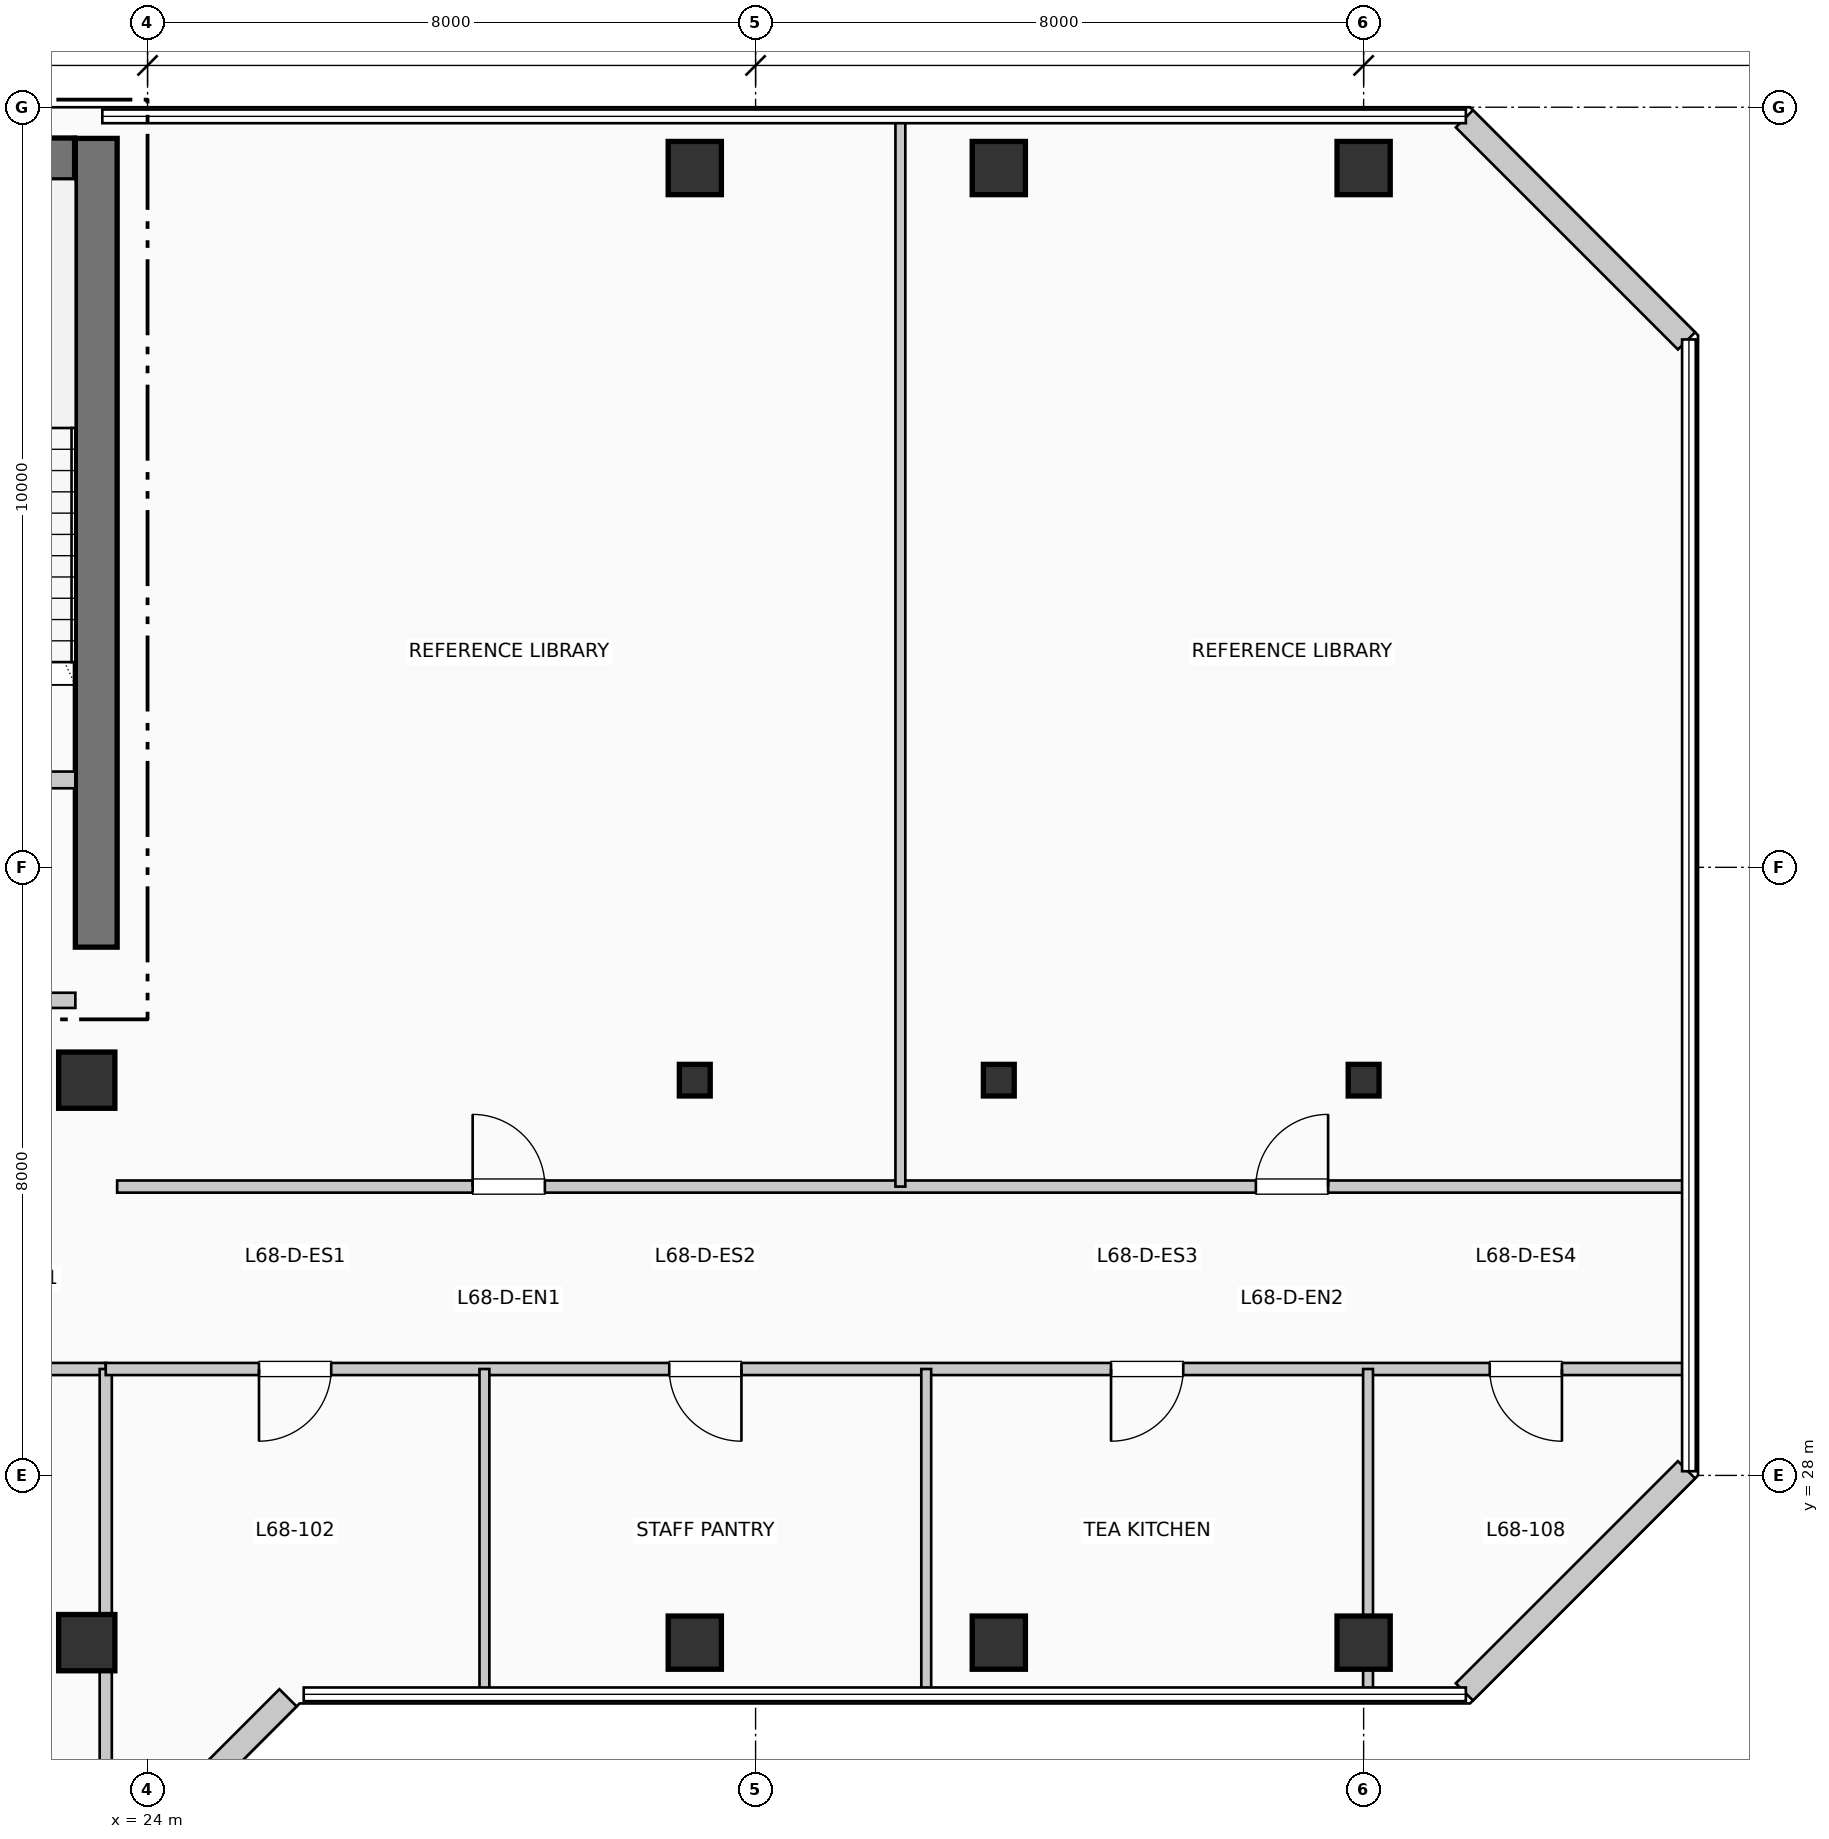
"""IFC4 building model, lengths in metres.
Left out: names, types, materials, properties, quantities, classifications, styles, units other than length and angle.
Written with IfcOpenShell. Run it as: python <this file> out.ifc"""

import sys

from ifc_helpers import new_model, si_unit, direction, frame, frame_2d, origin, origin_2d, place, context, subcontext, project, spatial, rectangle, i_section, extrude, element, fill, save


model = new_model("IFC4")
c1 = context("Model", 3, precision=1e-05, world=origin(), true_north=direction((0.0, 1.0)))
c2 = subcontext(c1, "Body", "Model", "MODEL_VIEW")
j1 = project(units=[si_unit("LENGTHUNIT", "METRE"), si_unit("PLANEANGLEUNIT", "RADIAN")], contexts=[c1])
p1 = place(None, origin())
s1 = spatial("IfcSite", under=j1, at=p1, CompositionType="ELEMENT")
p2 = place(p1, origin())
s2 = spatial("IfcBuilding", under=s1, at=p2, CompositionType="ELEMENT")
p3 = place(p2, frame((0.0, 0.0, 280.17)))
s3 = spatial("IfcBuildingStorey", under=s2, at=p3, CompositionType="ELEMENT", Elevation=280.17)
p4 = place(p3, frame((23.325, 34.95, 0.0), z_axis=(0.0, 0.0, 1.0), x_axis=(0.0, 1.0, 0.0)))
e1 = element("IfcWall", 1, at=p4, inside=s3, PredefinedType="SHEAR", context=c2, shape_type="SweptSolid", body=[
    extrude(rectangle(XDim=10.64, YDim=0.55, at=frame_2d((5.32, 0.0))), origin(), (0.0, 0.0, 1.0), 3.96),
])
p5 = place(p3, frame((19.35, 45.32, 0.0), z_axis=(0.0, 0.0, 1.0), x_axis=(1.0, 0.0, 0.0)))
e2 = element("IfcWall", 2, at=p5, inside=s3, PredefinedType="SHEAR", context=c2, shape_type="SweptSolid", body=[
    extrude(rectangle(XDim=3.69, YDim=0.55, at=frame_2d((1.845, 0.0))), origin(), (0.0, 0.0, 1.0), 3.96),
])
p6 = place(p5, frame((1.15, 0.0, 1.05)))
e3 = element("IfcOpeningElement", 3, at=p6, cuts=e2, PredefinedType="OPENING", context=c2, shape_type="SweptSolid", body=[
    extrude(rectangle(XDim=1.4, YDim=1.8, at=frame_2d((0.7, 0.9))), frame((0.0, 0.285, 0.0), z_axis=(0.0, -1.0, 0.0), x_axis=(1.0, 0.0, 0.0)), (0.0, 0.0, 1.0), 0.57),
])
for number, where, z_axis, x_axis in (
    (4, (23.2, 25.8, 0.0), (0.0, 0.0, 1.0), (1.0, 0.0, 0.0)),
    (5, (23.2, 33.2, 0.0), (0.0, 0.0, 1.0), (1.0, 0.0, 0.0)),
):
    element("IfcColumn", number, at=place(p3, frame(where, z_axis=z_axis, x_axis=x_axis)), inside=s3, PredefinedType="COLUMN", context=c2, shape_type="SweptSolid", body=[
        extrude(rectangle(XDim=0.74, YDim=0.74, at=origin_2d()), origin(), (0.0, 0.0, 1.0), 3.96),
    ])
p7 = place(p3, frame((31.2, 25.8, 0.0), z_axis=(0.0, 0.0, 1.0), x_axis=(1.0, 0.0, 0.0)))
e6 = element("IfcColumn", 6, at=p7, inside=s3, PredefinedType="COLUMN", context=c2, shape_type="SweptSolid", body=[
    extrude(rectangle(XDim=0.7, YDim=0.7, at=origin_2d()), origin(), (0.0, 0.0, 1.0), 3.96),
])
p8 = place(p3, frame((31.2, 33.2, 0.0), z_axis=(0.0, 0.0, 1.0), x_axis=(1.0, 0.0, 0.0)))
e7 = element("IfcColumn", 7, at=p8, inside=s3, PredefinedType="COLUMN", context=c2, shape_type="SweptSolid", body=[
    extrude(i_section(OverallWidth=0.406, OverallDepth=0.416, WebThickness=0.022, FlangeThickness=0.036, at=origin_2d()), origin(), (0.0, 0.0, 1.0), 3.96),
])
for number, where, z_axis, x_axis in (
    (8, (31.2, 45.2, 0.0), (0.0, 0.0, 1.0), (1.0, 0.0, 0.0)),
    (9, (35.2, 25.8, 0.0), (0.0, 0.0, 1.0), (1.0, 0.0, 0.0)),
):
    element("IfcColumn", number, at=place(p3, frame(where, z_axis=z_axis, x_axis=x_axis)), inside=s3, PredefinedType="COLUMN", context=c2, shape_type="SweptSolid", body=[
        extrude(rectangle(XDim=0.7, YDim=0.7, at=origin_2d()), origin(), (0.0, 0.0, 1.0), 3.96),
    ])
p9 = place(p3, frame((35.2, 33.2, 0.0), z_axis=(0.0, 0.0, 1.0), x_axis=(1.0, 0.0, 0.0)))
e10 = element("IfcColumn", 10, at=p9, inside=s3, PredefinedType="COLUMN", context=c2, shape_type="SweptSolid", body=[
    extrude(i_section(OverallWidth=0.406, OverallDepth=0.416, WebThickness=0.022, FlangeThickness=0.036, at=origin_2d()), origin(), (0.0, 0.0, 1.0), 3.96),
])
for number, where, z_axis, x_axis in (
    (11, (35.2, 45.2, 0.0), (0.0, 0.0, 1.0), (1.0, 0.0, 0.0)),
    (12, (40.0, 25.8, 0.0), (0.0, 0.0, 1.0), (1.0, 0.0, 0.0)),
):
    element("IfcColumn", number, at=place(p3, frame(where, z_axis=z_axis, x_axis=x_axis)), inside=s3, PredefinedType="COLUMN", context=c2, shape_type="SweptSolid", body=[
        extrude(rectangle(XDim=0.7, YDim=0.7, at=origin_2d()), origin(), (0.0, 0.0, 1.0), 3.96),
    ])
p10 = place(p3, frame((40.0, 33.2, 0.0), z_axis=(0.0, 0.0, 1.0), x_axis=(1.0, 0.0, 0.0)))
e13 = element("IfcColumn", 13, at=p10, inside=s3, PredefinedType="COLUMN", context=c2, shape_type="SweptSolid", body=[
    extrude(i_section(OverallWidth=0.406, OverallDepth=0.416, WebThickness=0.022, FlangeThickness=0.036, at=origin_2d()), origin(), (0.0, 0.0, 1.0), 3.96),
])
p11 = place(p3, frame((40.0, 45.2, 0.0), z_axis=(0.0, 0.0, 1.0), x_axis=(1.0, 0.0, 0.0)))
e14 = element("IfcColumn", 14, at=p11, inside=s3, PredefinedType="COLUMN", context=c2, shape_type="SweptSolid", body=[
    extrude(rectangle(XDim=0.7, YDim=0.7, at=origin_2d()), origin(), (0.0, 0.0, 1.0), 3.96),
])
p12 = place(p3, frame((23.926, 23.152, 0.0), z_axis=(0.0, 0.0, 1.0), x_axis=(0.707106781187, 0.707106781187, 0.0)))
e15 = element("IfcWall", 15, at=p12, inside=s3, PredefinedType="SOLIDWALL", context=c2, shape_type="SweptSolid", body=[
    extrude(rectangle(XDim=2.718, YDim=0.32, at=frame_2d((1.359, 0.0))), origin(), (0.0, 0.0, 1.0), 3.74),
])
for number, where, z_axis, x_axis in (
    (16, (41.326, 25.152, 0.0), (0.0, 0.0, 1.0), (0.707, 0.707, 0.0)),
    (17, (44.248, 42.926, 0.0), (0.0, 0.0, 1.0), (-0.707, 0.707, 0.0)),
):
    element("IfcWall", number, at=place(p3, frame(where, z_axis=z_axis, x_axis=x_axis)), inside=s3, PredefinedType="SOLIDWALL", context=c2, shape_type="SweptSolid", body=[
        extrude(rectangle(XDim=4.133, YDim=0.32, at=frame_2d((2.066, 0.0))), origin(), (0.0, 0.0, 1.0), 3.74),
    ])
p13 = place(p3, frame((19.9, 37.15, 0.0), z_axis=(0.0, 0.0, 1.0), x_axis=(1.0, 0.0, 0.0)))
e18 = element("IfcWall", 18, at=p13, inside=s3, PredefinedType="PARTITIONING", context=c2, shape_type="SweptSolid", body=[
    extrude(rectangle(XDim=3.15, YDim=0.22, at=frame_2d((1.575, 0.0))), origin(), (0.0, 0.0, 1.0), 3.74),
])
p14 = place(p13, frame((2.05, 0.0, 0.0), z_axis=(0.0, 0.0, 1.0), x_axis=(-1.0, 0.0, 0.0)))
e19 = element("IfcOpeningElement", 19, at=p14, cuts=e18, PredefinedType="OPENING", context=c2, shape_type="SweptSolid", body=[
    extrude(rectangle(XDim=1.05, YDim=2.15, at=frame_2d((0.525, 1.075))), frame((0.0, 0.12, 0.0), z_axis=(0.0, -1.0, 0.0), x_axis=(1.0, 0.0, 0.0)), (0.0, 0.0, 1.0), 0.24),
])
p15 = place(p3, frame((19.8, 34.25, 0.0), z_axis=(0.0, 0.0, 1.0), x_axis=(1.0, 0.0, 0.0)))
e20 = element("IfcWall", 20, at=p15, inside=s3, PredefinedType="PARTITIONING", context=c2, shape_type="SweptSolid", body=[
    extrude(rectangle(XDim=3.25, YDim=0.2, at=frame_2d((1.625, 0.0))), origin(), (0.0, 0.0, 1.0), 3.74),
])
p16 = place(p15, frame((2.15, 0.0, 0.0), z_axis=(0.0, 0.0, 1.0), x_axis=(-1.0, 0.0, 0.0)))
e21 = element("IfcOpeningElement", 21, at=p16, cuts=e20, PredefinedType="OPENING", context=c2, shape_type="SweptSolid", body=[
    extrude(rectangle(XDim=1.1, YDim=2.15, at=frame_2d((0.55, 1.075))), frame((0.0, 0.11, 0.0), z_axis=(0.0, -1.0, 0.0), x_axis=(1.0, 0.0, 0.0)), (0.0, 0.0, 1.0), 0.22),
])
p17 = place(p3, frame((7.14, 29.4, 0.0), z_axis=(0.0, 0.0, 1.0), x_axis=(1.0, 0.0, 0.0)))
e22 = element("IfcWall", 22, at=p17, inside=s3, PredefinedType="PARTITIONING", context=c2, shape_type="SweptSolid", body=[
    extrude(rectangle(XDim=16.31, YDim=0.16, at=frame_2d((8.155, 0.0))), origin(), (0.0, 0.0, 1.0), 3.425),
])
p18 = place(p3, frame((23.45, 6.84, 0.0), z_axis=(0.0, 0.0, 1.0), x_axis=(0.0, 1.0, 0.0)))
e23 = element("IfcWall", 23, at=p18, inside=s3, PredefinedType="PARTITIONING", context=c2, shape_type="SweptSolid", body=[
    extrude(rectangle(XDim=22.56, YDim=0.16, at=frame_2d((11.28, 0.0))), origin(), (0.0, 0.0, 1.0), 3.175),
])
p19 = place(p3, frame((23.45, 29.4, 0.0), z_axis=(0.0, 0.0, 1.0), x_axis=(1.0, 0.0, 0.0)))
e24 = element("IfcWall", 24, at=p19, inside=s3, PredefinedType="PARTITIONING", context=c2, shape_type="SweptSolid", body=[
    extrude(rectangle(XDim=20.76, YDim=0.16, at=frame_2d((10.38, 0.0))), origin(), (0.0, 0.0, 1.0), 3.425),
])
p20 = place(p19, frame((2.966, 0.0, 0.0), z_axis=(0.0, 0.0, 1.0), x_axis=(-1.0, 0.0, 0.0)))
e25 = element("IfcOpeningElement", 25, at=p20, cuts=e24, PredefinedType="OPENING", context=c2, shape_type="SweptSolid", body=[
    extrude(rectangle(XDim=0.95, YDim=2.15, at=frame_2d((0.475, 1.075))), frame((0.0, 0.09, 0.0), z_axis=(0.0, -1.0, 0.0), x_axis=(1.0, 0.0, 0.0)), (0.0, 0.0, 1.0), 0.18),
])
p21 = place(p19, frame((8.364, 0.0, 0.0), z_axis=(0.0, 0.0, 1.0), x_axis=(-1.0, 0.0, 0.0)))
e26 = element("IfcOpeningElement", 26, at=p21, cuts=e24, PredefinedType="OPENING", context=c2, shape_type="SweptSolid", body=[
    extrude(rectangle(XDim=0.95, YDim=2.15, at=frame_2d((0.475, 1.075))), frame((0.0, 0.09, 0.0), z_axis=(0.0, -1.0, 0.0), x_axis=(1.0, 0.0, 0.0)), (0.0, 0.0, 1.0), 0.18),
])
p22 = place(p19, frame((14.177, 0.0, 0.0), z_axis=(0.0, 0.0, 1.0), x_axis=(-1.0, 0.0, 0.0)))
e27 = element("IfcOpeningElement", 27, at=p22, cuts=e24, PredefinedType="OPENING", context=c2, shape_type="SweptSolid", body=[
    extrude(rectangle(XDim=0.95, YDim=2.15, at=frame_2d((0.475, 1.075))), frame((0.0, 0.09, 0.0), z_axis=(0.0, -1.0, 0.0), x_axis=(1.0, 0.0, 0.0)), (0.0, 0.0, 1.0), 0.18),
])
p23 = place(p19, frame((19.159, 0.0, 0.0), z_axis=(0.0, 0.0, 1.0), x_axis=(-1.0, 0.0, 0.0)))
e28 = element("IfcOpeningElement", 28, at=p23, cuts=e24, PredefinedType="OPENING", context=c2, shape_type="SweptSolid", body=[
    extrude(rectangle(XDim=0.95, YDim=2.15, at=frame_2d((0.475, 1.075))), frame((0.0, 0.09, 0.0), z_axis=(0.0, -1.0, 0.0), x_axis=(1.0, 0.0, 0.0)), (0.0, 0.0, 1.0), 0.18),
])
p24 = place(p3, frame((23.6, 31.8, 0.0), z_axis=(0.0, 0.0, 1.0), x_axis=(1.0, 0.0, 0.0)))
e29 = element("IfcWall", 29, at=p24, inside=s3, PredefinedType="PARTITIONING", context=c2, shape_type="SweptSolid", body=[
    extrude(rectangle(XDim=20.61, YDim=0.16, at=frame_2d((10.305, 0.0))), origin(), (0.0, 0.0, 1.0), 3.74),
])
p25 = place(p24, frame((4.677, 0.0, 0.0)))
e30 = element("IfcOpeningElement", 30, at=p25, cuts=e29, PredefinedType="OPENING", context=c2, shape_type="SweptSolid", body=[
    extrude(rectangle(XDim=0.95, YDim=2.15, at=frame_2d((0.475, 1.075))), frame((0.0, 0.09, 0.0), z_axis=(0.0, -1.0, 0.0), x_axis=(1.0, 0.0, 0.0)), (0.0, 0.0, 1.0), 0.18),
])
p26 = place(p24, frame((14.982, 0.0, 0.0)))
e31 = element("IfcOpeningElement", 31, at=p26, cuts=e29, PredefinedType="OPENING", context=c2, shape_type="SweptSolid", body=[
    extrude(rectangle(XDim=0.95, YDim=2.15, at=frame_2d((0.475, 1.075))), frame((0.0, 0.09, 0.0), z_axis=(0.0, -1.0, 0.0), x_axis=(1.0, 0.0, 0.0)), (0.0, 0.0, 1.0), 0.18),
])
for number, where, z_axis, x_axis in (
    (32, (28.432, 25.19, 0.0), (0.0, 0.0, 1.0), (0.0, 1.0, 0.0)),
    (33, (34.245, 25.19, 0.0), (0.0, 0.0, 1.0), (0.0, 1.0, 0.0)),
):
    element("IfcWall", number, at=place(p3, frame(where, z_axis=z_axis, x_axis=x_axis)), inside=s3, PredefinedType="PARTITIONING", context=c2, shape_type="SweptSolid", body=[
        extrude(rectangle(XDim=4.21, YDim=0.13, at=frame_2d((2.105, 0.0))), origin(), (0.0, 0.0, 1.0), 3.74),
    ])
p27 = place(p3, frame((40.058, 25.19, 0.0), z_axis=(0.0, 0.0, 1.0), x_axis=(0.0, 1.0, 0.0)))
e34 = element("IfcWall", 34, at=p27, inside=s3, PredefinedType="PARTITIONING", context=c2, shape_type="SweptSolid", body=[
    extrude(rectangle(XDim=4.21, YDim=0.13, at=frame_2d((2.105, 0.0))), origin(), (0.0, 0.0, 1.0), 3.175),
])
p28 = place(p3, frame((33.905, 31.8, 0.0), z_axis=(0.0, 0.0, 1.0), x_axis=(0.0, 1.0, 0.0)))
e35 = element("IfcWall", 35, at=p28, inside=s3, PredefinedType="PARTITIONING", context=c2, shape_type="SweptSolid", body=[
    extrude(rectangle(XDim=14.01, YDim=0.13, at=frame_2d((7.005, 0.0))), origin(), (0.0, 0.0, 1.0), 3.74),
])
p29 = place(p20, origin())
e36 = element("IfcDoor", 36, at=p29, inside=s3, OperationType="SINGLE_SWING_LEFT", PredefinedType="DOOR", context=c2, shape_type="SweptSolid", body=[
    extrude(rectangle(XDim=0.95, YDim=2.15, at=frame_2d((0.475, 1.075))), frame((0.0, 0.025, 0.0), z_axis=(0.0, -1.0, 0.0), x_axis=(1.0, 0.0, 0.0)), (0.0, 0.0, 1.0), 0.05),
])
fill(e25, e36)
p30 = place(p21, origin())
e37 = element("IfcDoor", 37, at=p30, inside=s3, OperationType="SINGLE_SWING_RIGHT", PredefinedType="DOOR", context=c2, shape_type="SweptSolid", body=[
    extrude(rectangle(XDim=0.95, YDim=2.15, at=frame_2d((0.475, 1.075))), frame((0.0, 0.025, 0.0), z_axis=(0.0, -1.0, 0.0), x_axis=(1.0, 0.0, 0.0)), (0.0, 0.0, 1.0), 0.05),
])
fill(e26, e37)
p31 = place(p22, origin())
e38 = element("IfcDoor", 38, at=p31, inside=s3, OperationType="SINGLE_SWING_LEFT", PredefinedType="DOOR", context=c2, shape_type="SweptSolid", body=[
    extrude(rectangle(XDim=0.95, YDim=2.15, at=frame_2d((0.475, 1.075))), frame((0.0, 0.025, 0.0), z_axis=(0.0, -1.0, 0.0), x_axis=(1.0, 0.0, 0.0)), (0.0, 0.0, 1.0), 0.05),
])
fill(e27, e38)
p32 = place(p23, origin())
e39 = element("IfcDoor", 39, at=p32, inside=s3, OperationType="SINGLE_SWING_RIGHT", PredefinedType="DOOR", context=c2, shape_type="SweptSolid", body=[
    extrude(rectangle(XDim=0.95, YDim=2.15, at=frame_2d((0.475, 1.075))), frame((0.0, 0.025, 0.0), z_axis=(0.0, -1.0, 0.0), x_axis=(1.0, 0.0, 0.0)), (0.0, 0.0, 1.0), 0.05),
])
fill(e28, e39)
p33 = place(p25, origin())
e40 = element("IfcDoor", 40, at=p33, inside=s3, OperationType="SINGLE_SWING_LEFT", PredefinedType="DOOR", context=c2, shape_type="SweptSolid", body=[
    extrude(rectangle(XDim=0.95, YDim=2.15, at=frame_2d((0.475, 1.075))), frame((0.0, 0.025, 0.0), z_axis=(0.0, -1.0, 0.0), x_axis=(1.0, 0.0, 0.0)), (0.0, 0.0, 1.0), 0.05),
])
fill(e30, e40)
p34 = place(p26, origin())
e41 = element("IfcDoor", 41, at=p34, inside=s3, OperationType="SINGLE_SWING_RIGHT", PredefinedType="DOOR", context=c2, shape_type="SweptSolid", body=[
    extrude(rectangle(XDim=0.95, YDim=2.15, at=frame_2d((0.475, 1.075))), frame((0.0, 0.025, 0.0), z_axis=(0.0, -1.0, 0.0), x_axis=(1.0, 0.0, 0.0)), (0.0, 0.0, 1.0), 0.05),
])
fill(e31, e41)
save(model, sys.argv[1])
